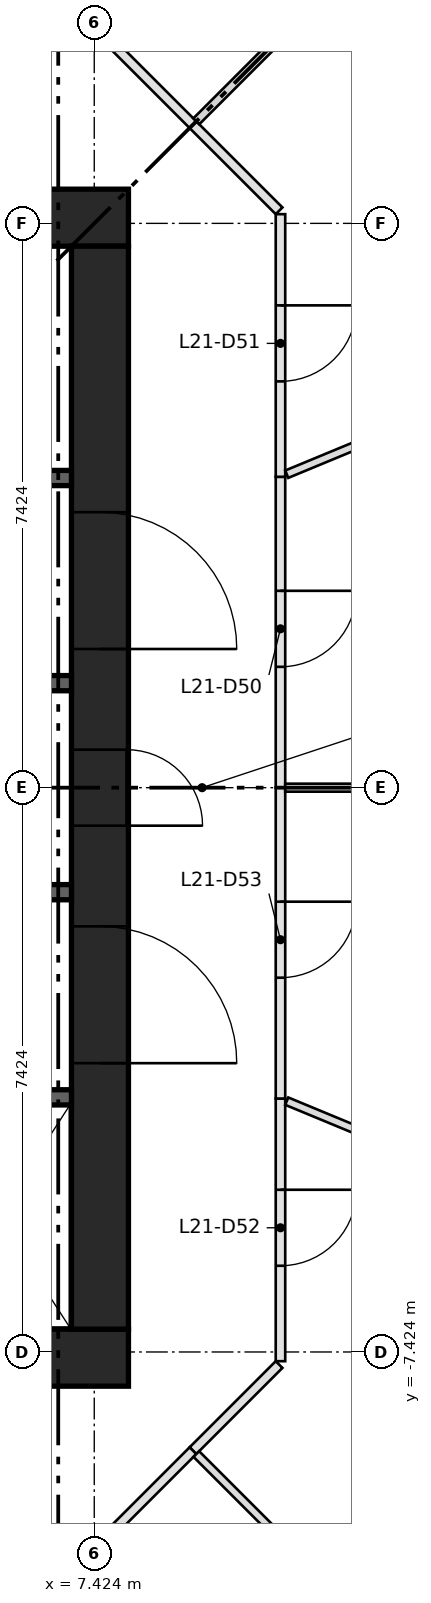
"""IFC4 building model, lengths in metres.
Left out: names, types, materials, properties, quantities, classifications, styles, units other than length and angle.
Written with IfcOpenShell. Run it as: python <this file> out.ifc"""

import sys

from ifc_helpers import new_model, si_unit, direction, frame, frame_2d, origin, place, context, subcontext, project, spatial, rectangle, extrude, element, fill, save


model = new_model("IFC4")
c1 = context("Model", 3, precision=1e-05, world=origin(), true_north=direction((0.0, 1.0)))
c2 = subcontext(c1, "Body", "Model", "MODEL_VIEW")
j1 = project(units=[si_unit("LENGTHUNIT", "METRE"), si_unit("PLANEANGLEUNIT", "RADIAN")], contexts=[c1])
p1 = place(None, origin())
s1 = spatial("IfcSite", under=j1, at=p1, CompositionType="ELEMENT")
p2 = place(p1, origin())
s2 = spatial("IfcBuilding", under=s1, at=p2, CompositionType="ELEMENT")
p3 = place(p2, frame((0.0, 0.0, 83.7)))
s3 = spatial("IfcBuildingStorey", under=s2, at=p3, CompositionType="ELEMENT", Elevation=83.7)
for number, where, z_axis, x_axis in (
    (1, (-7.874, -7.499, 0.0), (0.0, 0.0, 1.0), (1.0, 0.0, 0.0)),
    (2, (-7.874, 7.499, 0.0), (0.0, 0.0, 1.0), (1.0, 0.0, 0.0)),
):
    element("IfcWall", number, at=place(p3, frame(where, z_axis=z_axis, x_axis=x_axis)), inside=s3, PredefinedType="SHEAR", context=c2, shape_type="SweptSolid", body=[
        extrude(rectangle(XDim=15.748, YDim=0.75, at=frame_2d((7.874, 0.0))), origin(), (0.0, 0.0, 1.0), 3.65),
    ])
p4 = place(p3, frame((7.499, -7.124, 0.0), z_axis=(0.0, 0.0, 1.0), x_axis=(0.0, 1.0, 0.0)))
e3 = element("IfcWall", 3, at=p4, inside=s3, PredefinedType="SHEAR", context=c2, shape_type="SweptSolid", body=[
    extrude(rectangle(XDim=14.248, YDim=0.75, at=frame_2d((7.124, 0.0))), origin(), (0.0, 0.0, 1.0), 3.65),
])
p5 = place(p4, frame((6.624, 0.0, 0.0)))
e4 = element("IfcOpeningElement", 4, at=p5, cuts=e3, PredefinedType="OPENING", context=c2, shape_type="SweptSolid", body=[
    extrude(rectangle(XDim=1.0, YDim=2.1, at=frame_2d((0.5, 1.05))), frame((0.0, 0.385, 0.0), z_axis=(0.0, -1.0, 0.0), x_axis=(1.0, 0.0, 0.0)), (0.0, 0.0, 1.0), 0.77),
])
p6 = place(p4, frame((3.5, 0.0, 0.0)))
e5 = element("IfcOpeningElement", 5, at=p6, cuts=e3, PredefinedType="OPENING", context=c2, shape_type="SweptSolid", body=[
    extrude(rectangle(XDim=1.8, YDim=2.1, at=frame_2d((0.9, 1.05))), frame((0.0, 0.385, 0.0), z_axis=(0.0, -1.0, 0.0), x_axis=(1.0, 0.0, 0.0)), (0.0, 0.0, 1.0), 0.77),
])
p7 = place(p4, frame((8.948, 0.0, 0.0)))
e6 = element("IfcOpeningElement", 6, at=p7, cuts=e3, PredefinedType="OPENING", context=c2, shape_type="SweptSolid", body=[
    extrude(rectangle(XDim=1.8, YDim=2.1, at=frame_2d((0.9, 1.05))), frame((0.0, 0.385, 0.0), z_axis=(0.0, -1.0, 0.0), x_axis=(1.0, 0.0, 0.0)), (0.0, 0.0, 1.0), 0.77),
])
p8 = place(p3, frame((-7.124, -4.074, 0.0), z_axis=(0.0, 0.0, 1.0), x_axis=(1.0, 0.0, 0.0)))
e7 = element("IfcWall", 7, at=p8, inside=s3, PredefinedType="SHEAR", context=c2, shape_type="SweptSolid", body=[
    extrude(rectangle(XDim=14.248, YDim=0.2, at=frame_2d((7.124, 0.0))), origin(), (0.0, 0.0, 1.0), 3.3),
])
p9 = place(p8, frame((1.069, 0.0, 0.0)))
e8 = element("IfcOpeningElement", 8, at=p9, cuts=e7, PredefinedType="OPENING", context=c2, shape_type="SweptSolid", body=[
    extrude(rectangle(XDim=1.1, YDim=2.1, at=frame_2d((0.55, 1.05))), frame((0.0, 0.11, 0.0), z_axis=(0.0, -1.0, 0.0), x_axis=(1.0, 0.0, 0.0)), (0.0, 0.0, 1.0), 0.22),
])
p10 = place(p8, frame((4.206, 0.0, 0.0)))
e9 = element("IfcOpeningElement", 9, at=p10, cuts=e7, PredefinedType="OPENING", context=c2, shape_type="SweptSolid", body=[
    extrude(rectangle(XDim=1.1, YDim=2.1, at=frame_2d((0.55, 1.05))), frame((0.0, 0.11, 0.0), z_axis=(0.0, -1.0, 0.0), x_axis=(1.0, 0.0, 0.0)), (0.0, 0.0, 1.0), 0.22),
])
p11 = place(p8, frame((6.808, 0.0, 0.0)))
e10 = element("IfcOpeningElement", 10, at=p11, cuts=e7, PredefinedType="OPENING", context=c2, shape_type="SweptSolid", body=[
    extrude(rectangle(XDim=1.0, YDim=2.1, at=frame_2d((0.5, 1.05))), frame((0.0, 0.11, 0.0), z_axis=(0.0, -1.0, 0.0), x_axis=(1.0, 0.0, 0.0)), (0.0, 0.0, 1.0), 0.22),
])
p12 = place(p8, frame((8.777, 0.0, 0.0)))
e11 = element("IfcOpeningElement", 11, at=p12, cuts=e7, PredefinedType="OPENING", context=c2, shape_type="SweptSolid", body=[
    extrude(rectangle(XDim=1.0, YDim=2.1, at=frame_2d((0.5, 1.05))), frame((0.0, 0.11, 0.0), z_axis=(0.0, -1.0, 0.0), x_axis=(1.0, 0.0, 0.0)), (0.0, 0.0, 1.0), 0.22),
])
p13 = place(p8, frame((10.745, 0.0, 0.0)))
e12 = element("IfcOpeningElement", 12, at=p13, cuts=e7, PredefinedType="OPENING", context=c2, shape_type="SweptSolid", body=[
    extrude(rectangle(XDim=1.0, YDim=2.1, at=frame_2d((0.5, 1.05))), frame((0.0, 0.11, 0.0), z_axis=(0.0, -1.0, 0.0), x_axis=(1.0, 0.0, 0.0)), (0.0, 0.0, 1.0), 0.22),
])
p14 = place(p8, frame((12.714, 0.0, 0.0)))
e13 = element("IfcOpeningElement", 13, at=p14, cuts=e7, PredefinedType="OPENING", context=c2, shape_type="SweptSolid", body=[
    extrude(rectangle(XDim=1.0, YDim=2.1, at=frame_2d((0.5, 1.05))), frame((0.0, 0.11, 0.0), z_axis=(0.0, -1.0, 0.0), x_axis=(1.0, 0.0, 0.0)), (0.0, 0.0, 1.0), 0.22),
])
p15 = place(p3, frame((0.0, 4.074, 0.0), z_axis=(0.0, 0.0, 1.0), x_axis=(1.0, 0.0, 0.0)))
e14 = element("IfcWall", 14, at=p15, inside=s3, PredefinedType="SHEAR", context=c2, shape_type="SweptSolid", body=[
    extrude(rectangle(XDim=7.124, YDim=0.2, at=frame_2d((3.562, 0.0))), origin(), (0.0, 0.0, 1.0), 3.3),
])
p16 = place(p15, frame((0.43, 0.0, 0.0)))
e15 = element("IfcOpeningElement", 15, at=p16, cuts=e14, PredefinedType="OPENING", context=c2, shape_type="SweptSolid", body=[
    extrude(rectangle(XDim=1.0, YDim=2.1, at=frame_2d((0.5, 1.05))), frame((0.0, 0.11, 0.0), z_axis=(0.0, -1.0, 0.0), x_axis=(1.0, 0.0, 0.0)), (0.0, 0.0, 1.0), 0.22),
])
p17 = place(p15, frame((2.153, 0.0, 0.0)))
e16 = element("IfcOpeningElement", 16, at=p17, cuts=e14, PredefinedType="OPENING", context=c2, shape_type="SweptSolid", body=[
    extrude(rectangle(XDim=1.0, YDim=2.1, at=frame_2d((0.5, 1.05))), frame((0.0, 0.11, 0.0), z_axis=(0.0, -1.0, 0.0), x_axis=(1.0, 0.0, 0.0)), (0.0, 0.0, 1.0), 0.22),
])
p18 = place(p15, frame((3.875, 0.0, 0.0)))
e17 = element("IfcOpeningElement", 17, at=p18, cuts=e14, PredefinedType="OPENING", context=c2, shape_type="SweptSolid", body=[
    extrude(rectangle(XDim=1.0, YDim=2.1, at=frame_2d((0.5, 1.05))), frame((0.0, 0.11, 0.0), z_axis=(0.0, -1.0, 0.0), x_axis=(1.0, 0.0, 0.0)), (0.0, 0.0, 1.0), 0.22),
])
p19 = place(p15, frame((5.79, 0.0, 0.0)))
e18 = element("IfcOpeningElement", 18, at=p19, cuts=e14, PredefinedType="OPENING", context=c2, shape_type="SweptSolid", body=[
    extrude(rectangle(XDim=0.8, YDim=2.1, at=frame_2d((0.4, 1.05))), frame((0.0, 0.11, 0.0), z_axis=(0.0, -1.0, 0.0), x_axis=(1.0, 0.0, 0.0)), (0.0, 0.0, 1.0), 0.22),
])
for number, where, z_axis, x_axis in (
    (19, (4.374, -1.375, 0.0), (0.0, 0.0, 1.0), (1.0, 0.0, 0.0)),
    (20, (4.374, 1.375, 0.0), (0.0, 0.0, 1.0), (1.0, 0.0, 0.0)),
):
    element("IfcWall", number, at=place(p3, frame(where, z_axis=z_axis, x_axis=x_axis)), inside=s3, PredefinedType="SHEAR", context=c2, shape_type="SweptSolid", body=[
        extrude(rectangle(XDim=2.75, YDim=0.2, at=frame_2d((1.375, 0.0))), origin(), (0.0, 0.0, 1.0), 3.3),
    ])
p20 = place(p3, frame((9.874, 4.09, 0.0), z_axis=(0.0, 0.0, 1.0), x_axis=(0.0, -1.0, 0.0)))
e21 = element("IfcWall", 21, at=p20, inside=s3, PredefinedType="PARTITIONING", context=c2, shape_type="SweptSolid", body=[
    extrude(rectangle(XDim=4.09, YDim=0.125, at=frame_2d((2.045, 0.0))), origin(), (0.0, 0.0, 1.0), 3.3),
])
p21 = place(p20, frame((1.5, 0.0, 0.0)))
e22 = element("IfcOpeningElement", 22, at=p21, cuts=e21, PredefinedType="OPENING", context=c2, shape_type="SweptSolid", body=[
    extrude(rectangle(XDim=1.0, YDim=2.1, at=frame_2d((0.5, 1.05))), frame((0.0, 0.073, 0.0), z_axis=(0.0, -1.0, 0.0), x_axis=(1.0, 0.0, 0.0)), (0.0, 0.0, 1.0), 0.145),
])
p22 = place(p3, frame((8.722, 8.722, 0.0), z_axis=(0.0, 0.0, 1.0), x_axis=(0.70718294931, -0.707030604857, 0.0)))
e23 = element("IfcWall", 23, at=p22, inside=s3, PredefinedType="PARTITIONING", context=c2, shape_type="SweptSolid", body=[
    extrude(rectangle(XDim=1.603, YDim=0.125, at=frame_2d((0.801, 0.0))), origin(), (0.0, 0.0, 1.0), 3.3),
])
p23 = place(p3, frame((9.874, 7.545, 0.0), z_axis=(0.0, 0.0, 1.0), x_axis=(0.0, -1.0, 0.0)))
e24 = element("IfcWall", 24, at=p23, inside=s3, PredefinedType="PARTITIONING", context=c2, shape_type="SweptSolid", body=[
    extrude(rectangle(XDim=3.455, YDim=0.125, at=frame_2d((1.728, 0.0))), origin(), (0.0, 0.0, 1.0), 3.3),
])
p24 = place(p23, frame((1.2, 0.0, 0.0)))
e25 = element("IfcOpeningElement", 25, at=p24, cuts=e24, PredefinedType="OPENING", context=c2, shape_type="SweptSolid", body=[
    extrude(rectangle(XDim=1.0, YDim=2.1, at=frame_2d((0.5, 1.05))), frame((0.0, 0.073, 0.0), z_axis=(0.0, -1.0, 0.0), x_axis=(1.0, 0.0, 0.0)), (0.0, 0.0, 1.0), 0.145),
])
p25 = place(p3, frame((9.856, -7.589, 0.0), z_axis=(0.0, 0.0, 1.0), x_axis=(-0.70718294931, -0.707030604857, 0.0)))
e26 = element("IfcWall", 26, at=p25, inside=s3, PredefinedType="PARTITIONING", context=c2, shape_type="SweptSolid", body=[
    extrude(rectangle(XDim=1.603, YDim=0.125, at=frame_2d((0.801, 0.0))), origin(), (0.0, 0.0, 1.0), 3.3),
])
p26 = place(p3, frame((9.874, -4.09, 0.0), z_axis=(0.0, 0.0, 1.0), x_axis=(0.0, -1.0, 0.0)))
e27 = element("IfcWall", 27, at=p26, inside=s3, PredefinedType="PARTITIONING", context=c2, shape_type="SweptSolid", body=[
    extrude(rectangle(XDim=3.455, YDim=0.125, at=frame_2d((1.728, 0.0))), origin(), (0.0, 0.0, 1.0), 3.3),
])
p27 = place(p26, frame((1.2, 0.0, 0.0)))
e28 = element("IfcOpeningElement", 28, at=p27, cuts=e27, PredefinedType="OPENING", context=c2, shape_type="SweptSolid", body=[
    extrude(rectangle(XDim=1.0, YDim=2.1, at=frame_2d((0.5, 1.05))), frame((0.0, 0.073, 0.0), z_axis=(0.0, -1.0, 0.0), x_axis=(1.0, 0.0, 0.0)), (0.0, 0.0, 1.0), 0.145),
])
p28 = place(p3, frame((9.874, 0.0, 0.0), z_axis=(0.0, 0.0, 1.0), x_axis=(0.0, -1.0, 0.0)))
e29 = element("IfcWall", 29, at=p28, inside=s3, PredefinedType="PARTITIONING", context=c2, shape_type="SweptSolid", body=[
    extrude(rectangle(XDim=4.09, YDim=0.125, at=frame_2d((2.045, 0.0))), origin(), (0.0, 0.0, 1.0), 3.3),
])
p29 = place(p28, frame((1.5, 0.0, 0.0)))
e30 = element("IfcOpeningElement", 30, at=p29, cuts=e29, PredefinedType="OPENING", context=c2, shape_type="SweptSolid", body=[
    extrude(rectangle(XDim=1.0, YDim=2.1, at=frame_2d((0.5, 1.05))), frame((0.0, 0.073, 0.0), z_axis=(0.0, -1.0, 0.0), x_axis=(1.0, 0.0, 0.0)), (0.0, 0.0, 1.0), 0.145),
])
for number, where, z_axis, x_axis in (
    (31, (7.589, 9.856, 0.0), (0.0, 0.0, 1.0), (0.707, -0.707, 0.0)),
    (32, (8.722, -8.722, 0.0), (0.0, 0.0, 1.0), (-0.707, -0.707, 0.0)),
):
    element("IfcWall", number, at=place(p3, frame(where, z_axis=z_axis, x_axis=x_axis)), inside=s3, PredefinedType="PARTITIONING", context=c2, shape_type="SweptSolid", body=[
        extrude(rectangle(XDim=1.603, YDim=0.125, at=frame_2d((0.801, 0.0))), origin(), (0.0, 0.0, 1.0), 3.3),
    ])
p30 = place(p3, frame((9.957, 4.124, 0.0), z_axis=(0.0, 0.0, 1.0), x_axis=(0.923862097388, 0.382725521764, 0.0)))
e33 = element("IfcWall", 33, at=p30, inside=s3, PredefinedType="PARTITIONING", context=c2, shape_type="SweptSolid", body=[
    extrude(rectangle(XDim=4.423, YDim=0.105, at=frame_2d((2.211, 0.0))), origin(), (0.0, 0.0, 1.0), 3.3),
])
p31 = place(p3, frame((15.2, 0.0, 0.0), z_axis=(0.0, 0.0, 1.0), x_axis=(-1.0, 0.0, 0.0)))
e34 = element("IfcWall", 34, at=p31, inside=s3, PredefinedType="PARTITIONING", context=c2, shape_type="SweptSolid", body=[
    extrude(rectangle(XDim=5.263, YDim=0.105, at=frame_2d((2.632, 0.0))), origin(), (0.0, 0.0, 1.0), 3.3),
])
p32 = place(p3, frame((12.848, 12.848, 0.0), z_axis=(0.0, 0.0, 1.0), x_axis=(-0.707106781187, -0.707106781187, 0.0)))
e35 = element("IfcWall", 35, at=p32, inside=s3, PredefinedType="PARTITIONING", context=c2, shape_type="SweptSolid", body=[
    extrude(rectangle(XDim=5.772, YDim=0.11, at=frame_2d((2.886, 0.0))), origin(), (0.0, 0.0, 1.0), 3.3),
])
p33 = place(p3, frame((8.767, -8.767, 0.0), z_axis=(0.0, 0.0, 1.0), x_axis=(0.707106781187, -0.707106781187, 0.0)))
e36 = element("IfcWall", 36, at=p33, inside=s3, PredefinedType="PARTITIONING", context=c2, shape_type="SweptSolid", body=[
    extrude(rectangle(XDim=5.772, YDim=0.105, at=frame_2d((2.886, 0.0))), origin(), (0.0, 0.0, 1.0), 3.3),
])
p34 = place(p3, frame((9.957, -4.124, 0.0), z_axis=(0.0, 0.0, 1.0), x_axis=(0.923862097388, -0.382725521764, 0.0)))
e37 = element("IfcWall", 37, at=p34, inside=s3, PredefinedType="PARTITIONING", context=c2, shape_type="SweptSolid", body=[
    extrude(rectangle(XDim=4.423, YDim=0.105, at=frame_2d((2.211, 0.0))), origin(), (0.0, 0.0, 1.0), 3.3),
])
p35 = place(p5, frame((1.0, 0.0, 0.0), z_axis=(0.0, 0.0, 1.0), x_axis=(-1.0, 0.0, 0.0)))
e38 = element("IfcDoor", 38, at=p35, inside=s3, OperationType="SINGLE_SWING_LEFT", PredefinedType="DOOR", context=c2, shape_type="SweptSolid", body=[
    extrude(rectangle(XDim=1.0, YDim=2.1, at=frame_2d((0.5, 1.05))), frame((0.0, 0.375, 0.0), z_axis=(0.0, -1.0, 0.0), x_axis=(1.0, 0.0, 0.0)), (0.0, 0.0, 1.0), 0.05),
])
fill(e4, e38)
p36 = place(p6, frame((1.8, 0.0, 0.0), z_axis=(0.0, 0.0, 1.0), x_axis=(-1.0, 0.0, 0.0)))
e39 = element("IfcDoor", 39, at=p36, inside=s3, OperationType="DOUBLE_DOOR_SINGLE_SWING", PredefinedType="DOOR", context=c2, shape_type="SweptSolid", body=[
    extrude(rectangle(XDim=1.8, YDim=2.1, at=frame_2d((0.9, 1.05))), frame((0.0, 0.025, 0.0), z_axis=(0.0, -1.0, 0.0), x_axis=(1.0, 0.0, 0.0)), (0.0, 0.0, 1.0), 0.05),
])
fill(e5, e39)
p37 = place(p7, frame((1.8, 0.0, 0.0), z_axis=(0.0, 0.0, 1.0), x_axis=(-1.0, 0.0, 0.0)))
e40 = element("IfcDoor", 40, at=p37, inside=s3, OperationType="DOUBLE_DOOR_SINGLE_SWING", PredefinedType="DOOR", context=c2, shape_type="SweptSolid", body=[
    extrude(rectangle(XDim=1.8, YDim=2.1, at=frame_2d((0.9, 1.05))), frame((0.0, 0.025, 0.0), z_axis=(0.0, -1.0, 0.0), x_axis=(1.0, 0.0, 0.0)), (0.0, 0.0, 1.0), 0.05),
])
fill(e6, e40)
p38 = place(p21, origin())
e41 = element("IfcDoor", 41, at=p38, inside=s3, OperationType="SINGLE_SWING_LEFT", PredefinedType="DOOR", context=c2, shape_type="SweptSolid", body=[
    extrude(rectangle(XDim=1.0, YDim=2.1, at=frame_2d((0.5, 1.05))), frame((0.0, 0.025, 0.0), z_axis=(0.0, -1.0, 0.0), x_axis=(1.0, 0.0, 0.0)), (0.0, 0.0, 1.0), 0.05),
])
fill(e22, e41)
p39 = place(p24, origin())
e42 = element("IfcDoor", 42, at=p39, inside=s3, OperationType="SINGLE_SWING_LEFT", PredefinedType="DOOR", context=c2, shape_type="SweptSolid", body=[
    extrude(rectangle(XDim=1.0, YDim=2.1, at=frame_2d((0.5, 1.05))), frame((0.0, 0.025, 0.0), z_axis=(0.0, -1.0, 0.0), x_axis=(1.0, 0.0, 0.0)), (0.0, 0.0, 1.0), 0.05),
])
fill(e25, e42)
p40 = place(p27, origin())
e43 = element("IfcDoor", 43, at=p40, inside=s3, OperationType="SINGLE_SWING_LEFT", PredefinedType="DOOR", context=c2, shape_type="SweptSolid", body=[
    extrude(rectangle(XDim=1.0, YDim=2.1, at=frame_2d((0.5, 1.05))), frame((0.0, 0.025, 0.0), z_axis=(0.0, -1.0, 0.0), x_axis=(1.0, 0.0, 0.0)), (0.0, 0.0, 1.0), 0.05),
])
fill(e28, e43)
p41 = place(p29, origin())
e44 = element("IfcDoor", 44, at=p41, inside=s3, OperationType="SINGLE_SWING_LEFT", PredefinedType="DOOR", context=c2, shape_type="SweptSolid", body=[
    extrude(rectangle(XDim=1.0, YDim=2.1, at=frame_2d((0.5, 1.05))), frame((0.0, 0.025, 0.0), z_axis=(0.0, -1.0, 0.0), x_axis=(1.0, 0.0, 0.0)), (0.0, 0.0, 1.0), 0.05),
])
fill(e30, e44)
save(model, sys.argv[1])
